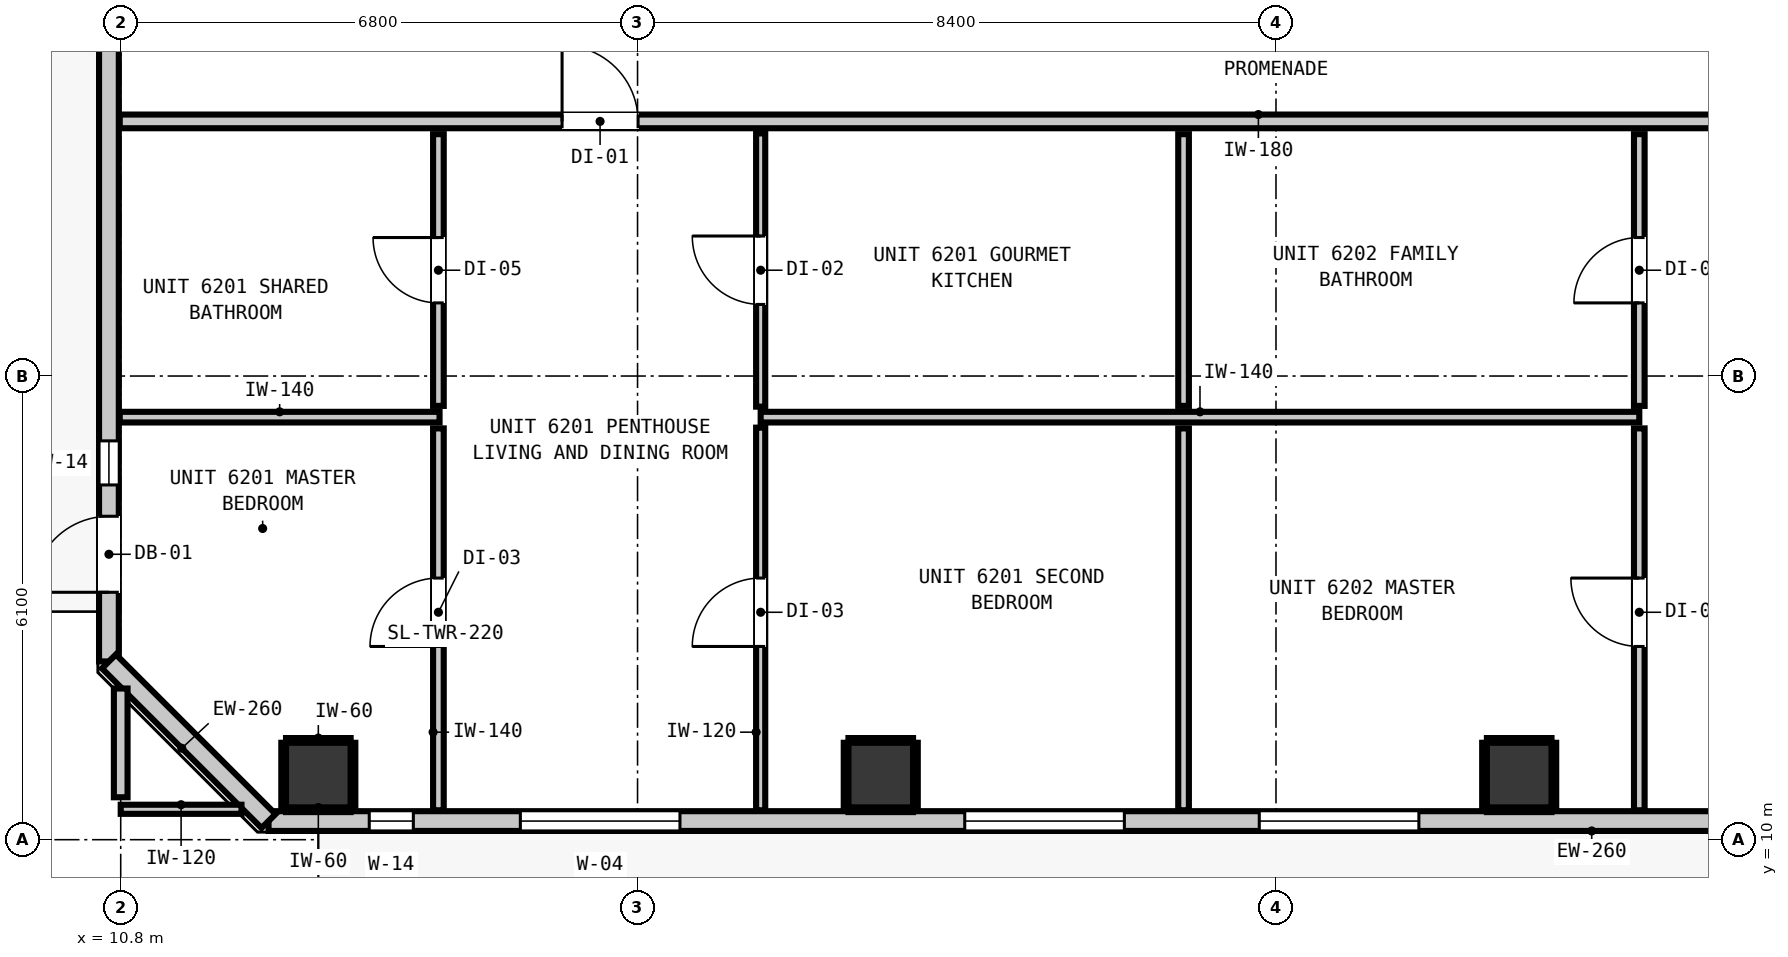
"""IFC4 building model, lengths in metres.
Left out: names, types, materials, properties, quantities, classifications, styles, units other than length and angle.
Written with IfcOpenShell. Run it as: python <this file> out.ifc"""

import sys

from ifc_helpers import new_model, si_unit, direction, frame, frame_2d, origin, origin_2d, place, context, subcontext, project, spatial, rectangle, extrude, element, fill, save


model = new_model("IFC4")
c1 = context("Model", 3, precision=1e-05, world=origin(), true_north=direction((0.0, 1.0)))
c2 = subcontext(c1, "Body", "Model", "MODEL_VIEW")
j1 = project(units=[si_unit("LENGTHUNIT", "METRE"), si_unit("PLANEANGLEUNIT", "RADIAN")], contexts=[c1])
p1 = place(None, origin())
s1 = spatial("IfcSite", under=j1, at=p1, CompositionType="ELEMENT")
p2 = place(p1, origin())
s2 = spatial("IfcBuilding", under=s1, at=p2, CompositionType="ELEMENT")
p3 = place(p2, frame((0.0, 0.0, 213.4)))
s3 = spatial("IfcBuildingStorey", under=s2, at=p3, CompositionType="ELEMENT", Elevation=213.4)
for number, where, z_axis, x_axis in (
    (1, (13.4, 10.85, 0.0), (0.0, 0.0, 1.0), (1.0, 0.0, 0.0)),
    (2, (20.8, 10.85, 0.0), (0.0, 0.0, 1.0), (1.0, 0.0, 0.0)),
    (3, (29.2, 10.85, 0.0), (0.0, 0.0, 1.0), (1.0, 0.0, 0.0)),
):
    element("IfcColumn", number, at=place(p3, frame(where, z_axis=z_axis, x_axis=x_axis)), inside=s3, PredefinedType="COLUMN", context=c2, shape_type="SweptSolid", body=[
        extrude(rectangle(XDim=0.85, YDim=0.85, at=origin_2d()), origin(), (0.0, 0.0, 1.0), 3.32),
    ])
p4 = place(p3, frame((10.645, 12.345, 0.0), z_axis=(0.0, 0.0, 1.0), x_axis=(0.0, 1.0, 0.0)))
e4 = element("IfcWall", 4, at=p4, inside=s3, PredefinedType="STANDARD", context=c2, shape_type="SweptSolid", body=[
    extrude(rectangle(XDim=30.31, YDim=0.26, at=frame_2d((15.155, 0.0))), origin(), (0.0, 0.0, 1.0), 3.1),
])
p5 = place(p4, frame((0.91, 0.0, 0.0)))
e5 = element("IfcOpeningElement", 5, at=p5, cuts=e4, PredefinedType="OPENING", context=c2, shape_type="SweptSolid", body=[
    extrude(rectangle(XDim=1.0, YDim=2.15, at=frame_2d((0.5, 1.075))), frame((0.0, 0.14, 0.0), z_axis=(0.0, -1.0, 0.0), x_axis=(1.0, 0.0, 0.0)), (0.0, 0.0, 1.0), 0.28),
])
p6 = place(p4, frame((2.322, 0.0, 0.85)))
e6 = element("IfcOpeningElement", 6, at=p6, cuts=e4, PredefinedType="OPENING", context=c2, shape_type="SweptSolid", body=[
    extrude(rectangle(XDim=0.58, YDim=1.5, at=frame_2d((0.29, 0.75))), frame((0.0, 0.14, 0.0), z_axis=(0.0, -1.0, 0.0), x_axis=(1.0, 0.0, 0.0)), (0.0, 0.0, 1.0), 0.28),
])
p7 = place(p3, frame((45.455, 10.245, 0.0), z_axis=(0.0, 0.0, 1.0), x_axis=(-1.0, 0.0, 0.0)))
e7 = element("IfcWall", 7, at=p7, inside=s3, PredefinedType="STANDARD", context=c2, shape_type="SweptSolid", body=[
    extrude(rectangle(XDim=32.71, YDim=0.26, at=frame_2d((16.355, 0.0))), origin(), (0.0, 0.0, 1.0), 3.1),
])
p8 = place(p7, frame((2.665, 0.0, 0.0)))
e8 = element("IfcOpeningElement", 8, at=p8, cuts=e7, PredefinedType="OPENING", context=c2, shape_type="SweptSolid", body=[
    extrude(rectangle(XDim=1.0, YDim=2.15, at=frame_2d((0.5, 1.075))), frame((0.0, 0.14, 0.0), z_axis=(0.0, -1.0, 0.0), x_axis=(1.0, 0.0, 0.0)), (0.0, 0.0, 1.0), 0.28),
])
p9 = place(p7, frame((27.297, 0.0, 0.85)))
e9 = element("IfcOpeningElement", 9, at=p9, cuts=e7, PredefinedType="OPENING", context=c2, shape_type="SweptSolid", body=[
    extrude(rectangle(XDim=2.1, YDim=1.9, at=frame_2d((1.05, 0.95))), frame((0.0, 0.14, 0.0), z_axis=(0.0, -1.0, 0.0), x_axis=(1.0, 0.0, 0.0)), (0.0, 0.0, 1.0), 0.28),
])
p10 = place(p7, frame((30.805, 0.0, 0.85)))
e10 = element("IfcOpeningElement", 10, at=p10, cuts=e7, PredefinedType="OPENING", context=c2, shape_type="SweptSolid", body=[
    extrude(rectangle(XDim=0.58, YDim=1.5, at=frame_2d((0.29, 0.75))), frame((0.0, 0.14, 0.0), z_axis=(0.0, -1.0, 0.0), x_axis=(1.0, 0.0, 0.0)), (0.0, 0.0, 1.0), 0.28),
])
p11 = place(p7, frame((21.45, 0.0, 0.85)))
e11 = element("IfcOpeningElement", 11, at=p11, cuts=e7, PredefinedType="OPENING", context=c2, shape_type="SweptSolid", body=[
    extrude(rectangle(XDim=2.1, YDim=1.9, at=frame_2d((1.05, 0.95))), frame((0.0, 0.14, 0.0), z_axis=(0.0, -1.0, 0.0), x_axis=(1.0, 0.0, 0.0)), (0.0, 0.0, 1.0), 0.28),
])
p12 = place(p7, frame((10.927, 0.0, 0.85)))
e12 = element("IfcOpeningElement", 12, at=p12, cuts=e7, PredefinedType="OPENING", context=c2, shape_type="SweptSolid", body=[
    extrude(rectangle(XDim=2.1, YDim=1.9, at=frame_2d((1.05, 0.95))), frame((0.0, 0.14, 0.0), z_axis=(0.0, -1.0, 0.0), x_axis=(1.0, 0.0, 0.0)), (0.0, 0.0, 1.0), 0.28),
])
p13 = place(p7, frame((17.575, 0.0, 0.85)))
e13 = element("IfcOpeningElement", 13, at=p13, cuts=e7, PredefinedType="OPENING", context=c2, shape_type="SweptSolid", body=[
    extrude(rectangle(XDim=2.1, YDim=1.9, at=frame_2d((1.05, 0.95))), frame((0.0, 0.14, 0.0), z_axis=(0.0, -1.0, 0.0), x_axis=(1.0, 0.0, 0.0)), (0.0, 0.0, 1.0), 0.28),
])
p14 = place(p7, frame((4.52, 0.0, 0.85)))
e14 = element("IfcOpeningElement", 14, at=p14, cuts=e7, PredefinedType="OPENING", context=c2, shape_type="SweptSolid", body=[
    extrude(rectangle(XDim=2.1, YDim=1.9, at=frame_2d((1.05, 0.95))), frame((0.0, 0.14, 0.0), z_axis=(0.0, -1.0, 0.0), x_axis=(1.0, 0.0, 0.0)), (0.0, 0.0, 1.0), 0.28),
])
p15 = place(p7, frame((0.548, 0.0, 0.85)))
e15 = element("IfcOpeningElement", 15, at=p15, cuts=e7, PredefinedType="OPENING", context=c2, shape_type="SweptSolid", body=[
    extrude(rectangle(XDim=1.05, YDim=1.65, at=frame_2d((0.525, 0.825))), frame((0.0, 0.14, 0.0), z_axis=(0.0, -1.0, 0.0), x_axis=(1.0, 0.0, 0.0)), (0.0, 0.0, 1.0), 0.28),
])
p16 = place(p3, frame((12.745, 10.245, 0.0), z_axis=(0.0, 0.0, 1.0), x_axis=(-0.707147883682, 0.707065676302, 0.0)))
e16 = element("IfcWall", 16, at=p16, inside=s3, PredefinedType="STANDARD", context=c2, shape_type="SweptSolid", body=[
    extrude(rectangle(XDim=2.97, YDim=0.26, at=frame_2d((1.485, 0.0))), origin(), (0.0, 0.0, 1.0), 3.1),
])
p17 = place(p3, frame((10.787, 19.45, 0.0), z_axis=(0.0, 0.0, 1.0), x_axis=(1.0, 0.0, 0.0)))
e17 = element("IfcWall", 17, at=p17, inside=s3, PredefinedType="PARTITIONING", context=c2, shape_type="SweptSolid", body=[
    extrude(rectangle(XDim=36.626, YDim=0.18, at=frame_2d((18.313, 0.0))), origin(), (0.0, 0.0, 1.0), 3.1),
])
p18 = place(p17, frame((5.82, 0.0, 0.0)))
e18 = element("IfcOpeningElement", 18, at=p18, cuts=e17, PredefinedType="OPENING", context=c2, shape_type="SweptSolid", body=[
    extrude(rectangle(XDim=1.0, YDim=2.15, at=frame_2d((0.5, 1.075))), frame((0.0, 0.1, 0.0), z_axis=(0.0, -1.0, 0.0), x_axis=(1.0, 0.0, 0.0)), (0.0, 0.0, 1.0), 0.2),
])
p19 = place(p17, frame((23.143, 0.0, 0.0)))
e19 = element("IfcOpeningElement", 19, at=p19, cuts=e17, PredefinedType="OPENING", context=c2, shape_type="SweptSolid", body=[
    extrude(rectangle(XDim=1.0, YDim=2.15, at=frame_2d((0.5, 1.075))), frame((0.0, 0.1, 0.0), z_axis=(0.0, -1.0, 0.0), x_axis=(1.0, 0.0, 0.0)), (0.0, 0.0, 1.0), 0.2),
])
p20 = place(p3, frame((10.787, 15.559, 0.0), z_axis=(0.0, 0.0, 1.0), x_axis=(1.0, 0.0, 0.0)))
e20 = element("IfcWall", 20, at=p20, inside=s3, PredefinedType="PARTITIONING", context=c2, shape_type="SweptSolid", body=[
    extrude(rectangle(XDim=4.208, YDim=0.14, at=frame_2d((2.104, 0.0))), origin(), (0.0, 0.0, 1.0), 3.1),
])
p21 = place(p3, frame((19.22, 15.559, 0.0), z_axis=(0.0, 0.0, 1.0), x_axis=(1.0, 0.0, 0.0)))
e21 = element("IfcWall", 21, at=p21, inside=s3, PredefinedType="PARTITIONING", context=c2, shape_type="SweptSolid", body=[
    extrude(rectangle(XDim=11.56, YDim=0.14, at=frame_2d((5.78, 0.0))), origin(), (0.0, 0.0, 1.0), 3.1),
])
p22 = place(p3, frame((10.8, 10.4, 0.0), z_axis=(0.0, 0.0, 1.0), x_axis=(1.0, 0.0, 0.0)))
e22 = element("IfcWall", 22, at=p22, inside=s3, PredefinedType="PARTITIONING", context=c2, shape_type="SweptSolid", body=[
    extrude(rectangle(XDim=1.589, YDim=0.12, at=frame_2d((0.794, 0.0))), origin(), (0.0, 0.0, 1.0), 3.1),
])
p23 = place(p3, frame((10.8, 10.558, 0.0), z_axis=(0.0, 0.0, 1.0), x_axis=(0.0, 1.0, 0.0)))
e23 = element("IfcWall", 23, at=p23, inside=s3, PredefinedType="PARTITIONING", context=c2, shape_type="SweptSolid", body=[
    extrude(rectangle(XDim=1.431, YDim=0.18, at=frame_2d((0.715, 0.0))), origin(), (0.0, 0.0, 1.0), 3.1),
])
p24 = place(p3, frame((14.98, 10.387, 0.0), z_axis=(0.0, 0.0, 1.0), x_axis=(0.0, 1.0, 0.0)))
e24 = element("IfcWall", 24, at=p24, inside=s3, PredefinedType="PARTITIONING", context=c2, shape_type="SweptSolid", body=[
    extrude(rectangle(XDim=5.024, YDim=0.14, at=frame_2d((2.512, 0.0))), origin(), (0.0, 0.0, 1.0), 3.1),
])
p25 = place(p24, frame((2.155, 0.0, 0.0)))
e25 = element("IfcOpeningElement", 25, at=p25, cuts=e24, PredefinedType="OPENING", context=c2, shape_type="SweptSolid", body=[
    extrude(rectangle(XDim=0.9, YDim=2.1, at=frame_2d((0.45, 1.05))), frame((0.0, 0.08, 0.0), z_axis=(0.0, -1.0, 0.0), x_axis=(1.0, 0.0, 0.0)), (0.0, 0.0, 1.0), 0.16),
])
p26 = place(p3, frame((14.98, 15.707, 0.0), z_axis=(0.0, 0.0, 1.0), x_axis=(0.0, 1.0, 0.0)))
e26 = element("IfcWall", 26, at=p26, inside=s3, PredefinedType="PARTITIONING", context=c2, shape_type="SweptSolid", body=[
    extrude(rectangle(XDim=3.575, YDim=0.14, at=frame_2d((1.788, 0.0))), origin(), (0.0, 0.0, 1.0), 3.1),
])
p27 = place(p26, frame((1.355, 0.0, 0.0)))
e27 = element("IfcOpeningElement", 27, at=p27, cuts=e26, PredefinedType="OPENING", context=c2, shape_type="SweptSolid", body=[
    extrude(rectangle(XDim=0.86, YDim=2.02, at=frame_2d((0.43, 1.01))), frame((0.0, 0.08, 0.0), z_axis=(0.0, -1.0, 0.0), x_axis=(1.0, 0.0, 0.0)), (0.0, 0.0, 1.0), 0.16),
])
p28 = place(p3, frame((24.784, 10.387, 0.0), z_axis=(0.0, 0.0, 1.0), x_axis=(0.0, 1.0, 0.0)))
e28 = element("IfcWall", 28, at=p28, inside=s3, PredefinedType="PARTITIONING", context=c2, shape_type="SweptSolid", body=[
    extrude(rectangle(XDim=5.024, YDim=0.14, at=frame_2d((2.512, 0.0))), origin(), (0.0, 0.0, 1.0), 3.1),
])
p29 = place(p3, frame((24.784, 15.707, 0.0), z_axis=(0.0, 0.0, 1.0), x_axis=(0.0, 1.0, 0.0)))
e29 = element("IfcWall", 29, at=p29, inside=s3, PredefinedType="PARTITIONING", context=c2, shape_type="SweptSolid", body=[
    extrude(rectangle(XDim=3.575, YDim=0.14, at=frame_2d((1.788, 0.0))), origin(), (0.0, 0.0, 1.0), 3.1),
])
p30 = place(p3, frame((30.78, 10.387, 0.0), z_axis=(0.0, 0.0, 1.0), x_axis=(0.0, 1.0, 0.0)))
e30 = element("IfcWall", 30, at=p30, inside=s3, PredefinedType="PARTITIONING", context=c2, shape_type="SweptSolid", body=[
    extrude(rectangle(XDim=5.024, YDim=0.14, at=frame_2d((2.512, 0.0))), origin(), (0.0, 0.0, 1.0), 3.1),
])
p31 = place(p30, frame((2.155, 0.0, 0.0)))
e31 = element("IfcOpeningElement", 31, at=p31, cuts=e30, PredefinedType="OPENING", context=c2, shape_type="SweptSolid", body=[
    extrude(rectangle(XDim=0.9, YDim=2.1, at=frame_2d((0.45, 1.05))), frame((0.0, 0.08, 0.0), z_axis=(0.0, -1.0, 0.0), x_axis=(1.0, 0.0, 0.0)), (0.0, 0.0, 1.0), 0.16),
])
p32 = place(p3, frame((30.78, 15.707, 0.0), z_axis=(0.0, 0.0, 1.0), x_axis=(0.0, 1.0, 0.0)))
e32 = element("IfcWall", 32, at=p32, inside=s3, PredefinedType="PARTITIONING", context=c2, shape_type="SweptSolid", body=[
    extrude(rectangle(XDim=3.575, YDim=0.14, at=frame_2d((1.788, 0.0))), origin(), (0.0, 0.0, 1.0), 3.1),
])
p33 = place(p32, frame((1.355, 0.0, 0.0)))
e33 = element("IfcOpeningElement", 33, at=p33, cuts=e32, PredefinedType="OPENING", context=c2, shape_type="SweptSolid", body=[
    extrude(rectangle(XDim=0.86, YDim=2.02, at=frame_2d((0.43, 1.01))), frame((0.0, 0.08, 0.0), z_axis=(0.0, -1.0, 0.0), x_axis=(1.0, 0.0, 0.0)), (0.0, 0.0, 1.0), 0.16),
])
p34 = place(p3, frame((19.22, 10.387, 0.0), z_axis=(0.0, 0.0, 1.0), x_axis=(0.0, 1.0, 0.0)))
e34 = element("IfcWall", 34, at=p34, inside=s3, PredefinedType="PARTITIONING", context=c2, shape_type="SweptSolid", body=[
    extrude(rectangle(XDim=5.034, YDim=0.12, at=frame_2d((2.517, 0.0))), origin(), (0.0, 0.0, 1.0), 3.1),
])
p35 = place(p34, frame((2.155, 0.0, 0.0)))
e35 = element("IfcOpeningElement", 35, at=p35, cuts=e34, PredefinedType="OPENING", context=c2, shape_type="SweptSolid", body=[
    extrude(rectangle(XDim=0.9, YDim=2.1, at=frame_2d((0.45, 1.05))), frame((0.0, 0.07, 0.0), z_axis=(0.0, -1.0, 0.0), x_axis=(1.0, 0.0, 0.0)), (0.0, 0.0, 1.0), 0.14),
])
p36 = place(p3, frame((19.22, 15.697, 0.0), z_axis=(0.0, 0.0, 1.0), x_axis=(0.0, 1.0, 0.0)))
e36 = element("IfcWall", 36, at=p36, inside=s3, PredefinedType="PARTITIONING", context=c2, shape_type="SweptSolid", body=[
    extrude(rectangle(XDim=3.595, YDim=0.12, at=frame_2d((1.797, 0.0))), origin(), (0.0, 0.0, 1.0), 3.1),
])
p37 = place(p36, frame((1.345, 0.0, 0.0)))
e37 = element("IfcOpeningElement", 37, at=p37, cuts=e36, PredefinedType="OPENING", context=c2, shape_type="SweptSolid", body=[
    extrude(rectangle(XDim=0.9, YDim=2.1, at=frame_2d((0.45, 1.05))), frame((0.0, 0.07, 0.0), z_axis=(0.0, -1.0, 0.0), x_axis=(1.0, 0.0, 0.0)), (0.0, 0.0, 1.0), 0.14),
])
for number, where, z_axis, x_axis in (
    (38, (12.975, 10.393, 0.0), (0.0, 0.0, 1.0), (1.0, 0.0, 0.0)),
    (39, (12.975, 11.307, 0.0), (0.0, 0.0, 1.0), (1.0, 0.0, 0.0)),
    (40, (12.943, 10.425, 0.0), (0.0, 0.0, 1.0), (0.0, 1.0, 0.0)),
    (41, (13.857, 10.425, 0.0), (0.0, 0.0, 1.0), (0.0, 1.0, 0.0)),
):
    element("IfcWall", number, at=place(p3, frame(where, z_axis=z_axis, x_axis=x_axis)), inside=s3, PredefinedType="PARTITIONING", context=c2, shape_type="SweptSolid", body=[
        extrude(rectangle(XDim=0.85, YDim=0.06, at=frame_2d((0.425, 0.0))), origin(), (0.0, 0.0, 1.0), 1.45),
    ])
for number, where, z_axis, x_axis in (
    (42, (20.375, 10.393, 0.0), (0.0, 0.0, 1.0), (1.0, 0.0, 0.0)),
    (43, (20.375, 11.307, 0.0), (0.0, 0.0, 1.0), (1.0, 0.0, 0.0)),
):
    element("IfcWall", number, at=place(p3, frame(where, z_axis=z_axis, x_axis=x_axis)), inside=s3, PredefinedType="PARTITIONING", context=c2, shape_type="SweptSolid", body=[
        extrude(rectangle(XDim=0.85, YDim=0.06, at=frame_2d((0.425, 0.0))), origin(), (0.0, 0.0, 1.0), 1.45),
    ])
for number, where, z_axis, x_axis in (
    (44, (20.343, 10.425, 0.0), (0.0, 0.0, 1.0), (0.0, 1.0, 0.0)),
    (45, (21.257, 10.425, 0.0), (0.0, 0.0, 1.0), (0.0, 1.0, 0.0)),
):
    element("IfcWall", number, at=place(p3, frame(where, z_axis=z_axis, x_axis=x_axis)), inside=s3, PredefinedType="PARTITIONING", context=c2, shape_type="SweptSolid", body=[
        extrude(rectangle(XDim=0.85, YDim=0.06, at=frame_2d((0.425, 0.0))), origin(), (0.0, 0.0, 1.0), 1.45),
    ])
for number, where, z_axis, x_axis in (
    (46, (28.775, 10.393, 0.0), (0.0, 0.0, 1.0), (1.0, 0.0, 0.0)),
    (47, (28.775, 11.307, 0.0), (0.0, 0.0, 1.0), (1.0, 0.0, 0.0)),
):
    element("IfcWall", number, at=place(p3, frame(where, z_axis=z_axis, x_axis=x_axis)), inside=s3, PredefinedType="PARTITIONING", context=c2, shape_type="SweptSolid", body=[
        extrude(rectangle(XDim=0.85, YDim=0.06, at=frame_2d((0.425, 0.0))), origin(), (0.0, 0.0, 1.0), 1.45),
    ])
for number, where, z_axis, x_axis in (
    (48, (28.743, 10.425, 0.0), (0.0, 0.0, 1.0), (0.0, 1.0, 0.0)),
    (49, (29.657, 10.425, 0.0), (0.0, 0.0, 1.0), (0.0, 1.0, 0.0)),
):
    element("IfcWall", number, at=place(p3, frame(where, z_axis=z_axis, x_axis=x_axis)), inside=s3, PredefinedType="PARTITIONING", context=c2, shape_type="SweptSolid", body=[
        extrude(rectangle(XDim=0.85, YDim=0.06, at=frame_2d((0.425, 0.0))), origin(), (0.0, 0.0, 1.0), 1.45),
    ])
p38 = place(p5, origin())
e50 = element("IfcDoor", 50, at=p38, inside=s3, OperationType="SINGLE_SWING_LEFT", PredefinedType="DOOR", context=c2, shape_type="SweptSolid", body=[
    extrude(rectangle(XDim=1.0, YDim=2.15, at=frame_2d((0.5, 1.075))), frame((0.0, 0.025, 0.0), z_axis=(0.0, -1.0, 0.0), x_axis=(1.0, 0.0, 0.0)), (0.0, 0.0, 1.0), 0.05),
])
fill(e5, e50)
p39 = place(p6, origin())
e51 = element("IfcWindow", 51, at=p39, inside=s3, PartitioningType="SINGLE_PANEL", PredefinedType="WINDOW", context=c2, shape_type="SweptSolid", body=[
    extrude(rectangle(XDim=0.58, YDim=1.5, at=frame_2d((0.29, 0.75))), frame((0.0, 0.03, 0.0), z_axis=(0.0, -1.0, 0.0), x_axis=(1.0, 0.0, 0.0)), (0.0, 0.0, 1.0), 0.06),
])
fill(e6, e51)
p40 = place(p9, origin())
e52 = element("IfcWindow", 52, at=p40, inside=s3, PartitioningType="SINGLE_PANEL", PredefinedType="WINDOW", context=c2, shape_type="SweptSolid", body=[
    extrude(rectangle(XDim=2.1, YDim=1.9, at=frame_2d((1.05, 0.95))), frame((0.0, 0.03, 0.0), z_axis=(0.0, -1.0, 0.0), x_axis=(1.0, 0.0, 0.0)), (0.0, 0.0, 1.0), 0.06),
])
fill(e9, e52)
p41 = place(p10, origin())
e53 = element("IfcWindow", 53, at=p41, inside=s3, PartitioningType="SINGLE_PANEL", PredefinedType="WINDOW", context=c2, shape_type="SweptSolid", body=[
    extrude(rectangle(XDim=0.58, YDim=1.5, at=frame_2d((0.29, 0.75))), frame((0.0, 0.03, 0.0), z_axis=(0.0, -1.0, 0.0), x_axis=(1.0, 0.0, 0.0)), (0.0, 0.0, 1.0), 0.06),
])
fill(e10, e53)
p42 = place(p11, origin())
e54 = element("IfcWindow", 54, at=p42, inside=s3, PartitioningType="SINGLE_PANEL", PredefinedType="WINDOW", context=c2, shape_type="SweptSolid", body=[
    extrude(rectangle(XDim=2.1, YDim=1.9, at=frame_2d((1.05, 0.95))), frame((0.0, 0.03, 0.0), z_axis=(0.0, -1.0, 0.0), x_axis=(1.0, 0.0, 0.0)), (0.0, 0.0, 1.0), 0.06),
])
fill(e11, e54)
p43 = place(p13, origin())
e55 = element("IfcWindow", 55, at=p43, inside=s3, PartitioningType="SINGLE_PANEL", PredefinedType="WINDOW", context=c2, shape_type="SweptSolid", body=[
    extrude(rectangle(XDim=2.1, YDim=1.9, at=frame_2d((1.05, 0.95))), frame((0.0, 0.03, 0.0), z_axis=(0.0, -1.0, 0.0), x_axis=(1.0, 0.0, 0.0)), (0.0, 0.0, 1.0), 0.06),
])
fill(e13, e55)
p44 = place(p18, origin())
e56 = element("IfcDoor", 56, at=p44, inside=s3, OperationType="SINGLE_SWING_LEFT", PredefinedType="DOOR", context=c2, shape_type="SweptSolid", body=[
    extrude(rectangle(XDim=1.0, YDim=2.15, at=frame_2d((0.5, 1.075))), frame((0.0, 0.025, 0.0), z_axis=(0.0, -1.0, 0.0), x_axis=(1.0, 0.0, 0.0)), (0.0, 0.0, 1.0), 0.05),
])
fill(e18, e56)
p45 = place(p27, origin())
e57 = element("IfcDoor", 57, at=p45, inside=s3, OperationType="SINGLE_SWING_RIGHT", PredefinedType="DOOR", context=c2, shape_type="SweptSolid", body=[
    extrude(rectangle(XDim=0.86, YDim=2.02, at=frame_2d((0.43, 1.01))), frame((0.0, 0.025, 0.0), z_axis=(0.0, -1.0, 0.0), x_axis=(1.0, 0.0, 0.0)), (0.0, 0.0, 1.0), 0.05),
])
fill(e27, e57)
p46 = place(p25, origin())
e58 = element("IfcDoor", 58, at=p46, inside=s3, OperationType="SINGLE_SWING_LEFT", PredefinedType="DOOR", context=c2, shape_type="SweptSolid", body=[
    extrude(rectangle(XDim=0.9, YDim=2.1, at=frame_2d((0.45, 1.05))), frame((0.0, 0.025, 0.0), z_axis=(0.0, -1.0, 0.0), x_axis=(1.0, 0.0, 0.0)), (0.0, 0.0, 1.0), 0.05),
])
fill(e25, e58)
p47 = place(p37, origin())
e59 = element("IfcDoor", 59, at=p47, inside=s3, OperationType="SINGLE_SWING_RIGHT", PredefinedType="DOOR", context=c2, shape_type="SweptSolid", body=[
    extrude(rectangle(XDim=0.9, YDim=2.1, at=frame_2d((0.45, 1.05))), frame((0.0, 0.025, 0.0), z_axis=(0.0, -1.0, 0.0), x_axis=(1.0, 0.0, 0.0)), (0.0, 0.0, 1.0), 0.05),
])
fill(e37, e59)
p48 = place(p35, origin())
e60 = element("IfcDoor", 60, at=p48, inside=s3, OperationType="SINGLE_SWING_LEFT", PredefinedType="DOOR", context=c2, shape_type="SweptSolid", body=[
    extrude(rectangle(XDim=0.9, YDim=2.1, at=frame_2d((0.45, 1.05))), frame((0.0, 0.025, 0.0), z_axis=(0.0, -1.0, 0.0), x_axis=(1.0, 0.0, 0.0)), (0.0, 0.0, 1.0), 0.05),
])
fill(e35, e60)
p49 = place(p33, origin())
e61 = element("IfcDoor", 61, at=p49, inside=s3, OperationType="SINGLE_SWING_LEFT", PredefinedType="DOOR", context=c2, shape_type="SweptSolid", body=[
    extrude(rectangle(XDim=0.86, YDim=2.02, at=frame_2d((0.43, 1.01))), frame((0.0, 0.025, 0.0), z_axis=(0.0, -1.0, 0.0), x_axis=(1.0, 0.0, 0.0)), (0.0, 0.0, 1.0), 0.05),
])
fill(e33, e61)
p50 = place(p31, origin())
e62 = element("IfcDoor", 62, at=p50, inside=s3, OperationType="SINGLE_SWING_RIGHT", PredefinedType="DOOR", context=c2, shape_type="SweptSolid", body=[
    extrude(rectangle(XDim=0.9, YDim=2.1, at=frame_2d((0.45, 1.05))), frame((0.0, 0.025, 0.0), z_axis=(0.0, -1.0, 0.0), x_axis=(1.0, 0.0, 0.0)), (0.0, 0.0, 1.0), 0.05),
])
fill(e31, e62)
save(model, sys.argv[1])
